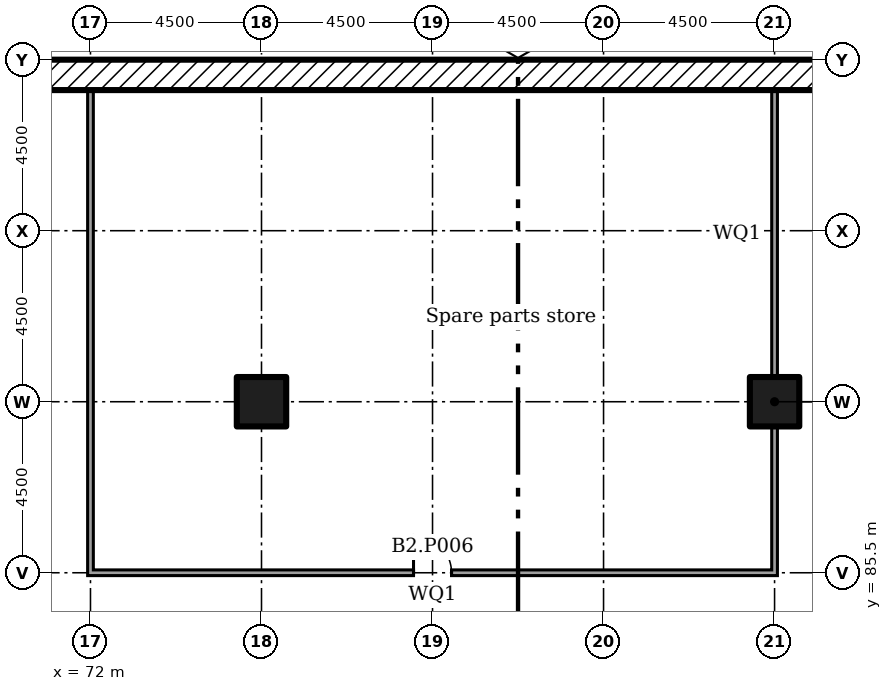
"""IFC4 building model, lengths in metres.
Left out: names, types, materials, properties, quantities, classifications, styles, units other than length and angle.
Written with IfcOpenShell. Run it as: python <this file> out.ifc"""

import sys

from ifc_helpers import new_model, si_unit, direction, frame, frame_2d, origin, origin_2d, place, context, subcontext, project, spatial, rectangle, extrude, element, fill, save


model = new_model("IFC4")
c1 = context("Model", 3, precision=1e-05, world=origin(), true_north=direction((0.0, 1.0)))
c2 = subcontext(c1, "Body", "Model", "MODEL_VIEW")
j1 = project(units=[si_unit("LENGTHUNIT", "METRE"), si_unit("PLANEANGLEUNIT", "RADIAN")], contexts=[c1])
p1 = place(None, origin())
s1 = spatial("IfcSite", under=j1, at=p1, CompositionType="ELEMENT")
p2 = place(p1, origin())
s2 = spatial("IfcBuilding", under=s1, at=p2, CompositionType="ELEMENT")
p3 = place(p2, frame((0.0, 0.0, -8.0)))
s3 = spatial("IfcBuildingStorey", under=s2, at=p3, CompositionType="ELEMENT", Elevation=-8.0)
for number, where in (
    (1, (76.5, 90.0, 0.0)),
    (2, (90.0, 90.0, 0.0)),
):
    element("IfcColumn", number, at=place(p3, frame(where)), inside=s3, PredefinedType="COLUMN", context=c2, shape_type="SweptSolid", body=[
        extrude(rectangle(XDim=1.3, YDim=1.3, at=origin_2d()), origin(), (0.0, 0.0, 1.0), 4.0),
    ])
p4 = place(p3, frame((0.0, 98.6, 0.0)))
e3 = element("IfcWall", 3, at=p4, inside=s3, PredefinedType="SOLIDWALL", context=c2, shape_type="SweptSolid", body=[
    extrude(rectangle(XDim=153.0, YDim=0.8, at=frame_2d((76.5, 0.0))), origin(), (0.0, 0.0, 1.0), 4.0),
])
p5 = place(p3, frame((72.0, 85.425, 0.0), z_axis=(0.0, 0.0, 1.0), x_axis=(0.0, 1.0, 0.0)))
e4 = element("IfcWall", 4, at=p5, inside=s3, PredefinedType="PARTITIONING", context=c2, shape_type="SweptSolid", body=[
    extrude(rectangle(XDim=12.775, YDim=0.15, at=frame_2d((6.387, 0.0))), origin(), (0.0, 0.0, 1.0), 3.55),
])
p6 = place(p3, frame((90.0, 85.425, 0.0), z_axis=(0.0, 0.0, 1.0), x_axis=(0.0, 1.0, 0.0)))
e5 = element("IfcWall", 5, at=p6, inside=s3, PredefinedType="PARTITIONING", context=c2, shape_type="SweptSolid", body=[
    extrude(rectangle(XDim=3.93, YDim=0.15, at=frame_2d((1.965, 0.0))), origin(), (0.0, 0.0, 1.0), 3.55),
])
p7 = place(p3, frame((90.0, 90.645, 0.0), z_axis=(0.0, 0.0, 1.0), x_axis=(0.0, 1.0, 0.0)))
e6 = element("IfcWall", 6, at=p7, inside=s3, PredefinedType="PARTITIONING", context=c2, shape_type="SweptSolid", body=[
    extrude(rectangle(XDim=7.555, YDim=0.15, at=frame_2d((3.777, 0.0))), origin(), (0.0, 0.0, 1.0), 3.55),
])
p8 = place(p3, frame((72.075, 85.5, 0.0)))
e7 = element("IfcWall", 7, at=p8, inside=s3, PredefinedType="PARTITIONING", context=c2, shape_type="SweptSolid", body=[
    extrude(rectangle(XDim=17.85, YDim=0.15, at=frame_2d((8.925, 0.0))), origin(), (0.0, 0.0, 1.0), 3.55),
])
p9 = place(p8, frame((8.425, 0.0, 0.0)))
e8 = element("IfcOpeningElement", 8, at=p9, cuts=e7, PredefinedType="OPENING", context=c2, shape_type="SweptSolid", body=[
    extrude(rectangle(XDim=1.0, YDim=2.1, at=frame_2d((0.5, 1.05))), frame((0.0, 0.085, 0.0), z_axis=(0.0, -1.0, 0.0), x_axis=(1.0, 0.0, 0.0)), (0.0, 0.0, 1.0), 0.17),
])
p10 = place(p9, origin())
e9 = element("IfcDoor", 9, at=p10, inside=s3, OperationType="SINGLE_SWING_RIGHT", PredefinedType="DOOR", context=c2, shape_type="SweptSolid", body=[
    extrude(rectangle(XDim=1.0, YDim=2.1, at=frame_2d((0.5, 1.05))), frame((0.0, 0.025, 0.0), z_axis=(0.0, -1.0, 0.0), x_axis=(1.0, 0.0, 0.0)), (0.0, 0.0, 1.0), 0.05),
])
fill(e8, e9)
save(model, sys.argv[1])
